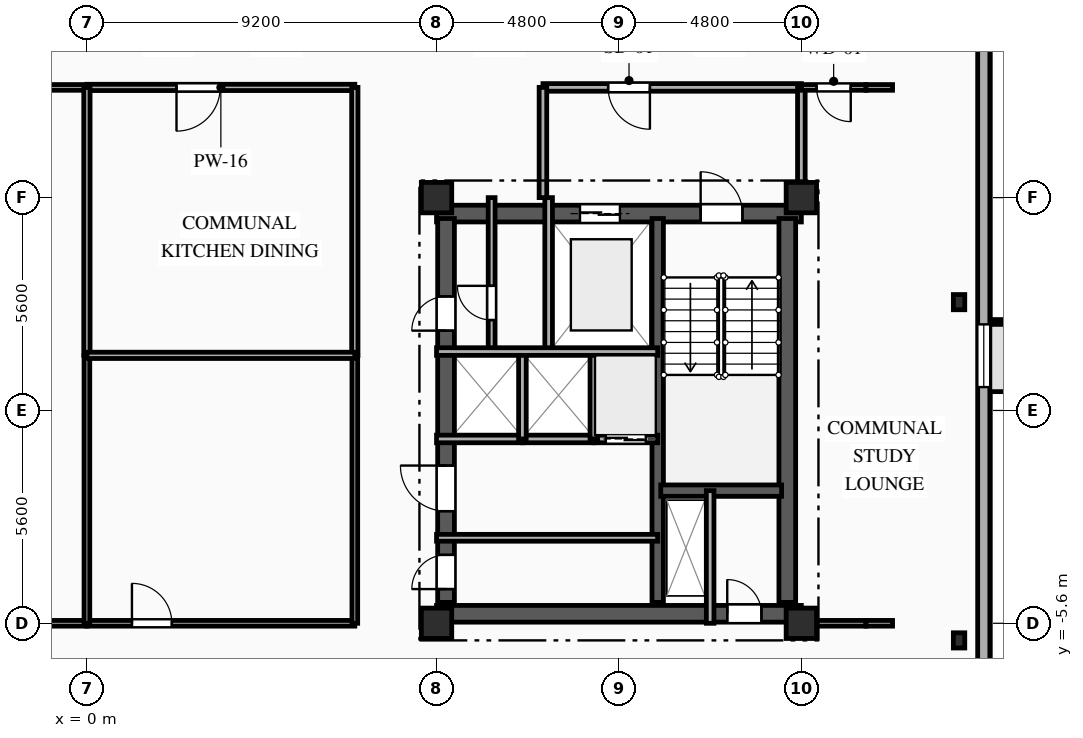
"""IFC4 building model, lengths in metres.
Left out: names, types, materials, properties, quantities, classifications, styles, units other than length and angle.
Written with IfcOpenShell. Run it as: python <this file> out.ifc"""

import sys

from ifc_helpers import new_model, si_unit, direction, frame, frame_2d, origin, origin_2d, place, context, subcontext, project, spatial, rectangle, i_section, extrude, element, fill, save


model = new_model("IFC4")
c1 = context("Model", 3, precision=1e-05, world=origin(), true_north=direction((0.0, 1.0)))
c2 = subcontext(c1, "Body", "Model", "MODEL_VIEW")
j1 = project(units=[si_unit("LENGTHUNIT", "METRE"), si_unit("PLANEANGLEUNIT", "RADIAN")], contexts=[c1])
p1 = place(None, origin())
s1 = spatial("IfcSite", under=j1, at=p1, CompositionType="ELEMENT")
p2 = place(p1, origin())
s2 = spatial("IfcBuilding", under=s1, at=p2, CompositionType="ELEMENT")
p3 = place(p2, frame((0.0, 0.0, 241.7)))
s3 = spatial("IfcBuildingStorey", under=s2, at=p3, CompositionType="ELEMENT", Elevation=241.7)
for number, where, z_axis, x_axis in (
    (1, (9.2, -5.6, 0.0), (0.0, 0.0, 1.0), (1.0, 0.0, 0.0)),
    (2, (9.2, 5.6, 0.0), (0.0, 0.0, 1.0), (1.0, 0.0, 0.0)),
    (3, (18.8, -5.6, 0.0), (0.0, 0.0, 1.0), (1.0, 0.0, 0.0)),
    (4, (18.8, 5.6, 0.0), (0.0, 0.0, 1.0), (1.0, 0.0, 0.0)),
):
    element("IfcColumn", number, at=place(p3, frame(where, z_axis=z_axis, x_axis=x_axis)), inside=s3, PredefinedType="COLUMN", context=c2, shape_type="SweptSolid", body=[
        extrude(rectangle(XDim=0.8, YDim=0.8, at=origin_2d()), origin(), (0.0, 0.0, 1.0), 3.35),
    ])
for number, where, z_axis, x_axis in (
    (5, (22.95, -6.05, 0.0), (0.0, 0.0, 1.0), (1.0, 0.0, 0.0)),
    (6, (22.95, 2.85, 0.0), (0.0, 0.0, 1.0), (1.0, 0.0, 0.0)),
):
    element("IfcColumn", number, at=place(p3, frame(where, z_axis=z_axis, x_axis=x_axis)), inside=s3, PredefinedType="COLUMN", context=c2, shape_type="SweptSolid", body=[
        extrude(i_section(OverallWidth=0.3, OverallDepth=0.4, WebThickness=0.013, FlangeThickness=0.024, FilletRadius=0.027, at=origin_2d()), origin(), (0.0, 0.0, 1.0), 3.35),
    ])
p4 = place(p3, frame((23.6, 12.4, 0.0), z_axis=(0.0, 0.0, 1.0), x_axis=(0.0, -1.0, 0.0)))
e7 = element("IfcWall", 7, at=p4, inside=s3, PredefinedType="SOLIDWALL", context=c2, shape_type="SweptSolid", body=[
    extrude(rectangle(XDim=28.0, YDim=0.32, at=frame_2d((14.0, 0.0))), origin(), (0.0, 0.0, 1.0), 3.04),
])
p5 = place(p4, frame((10.135, 0.0, 0.85)))
e8 = element("IfcOpeningElement", 8, at=p5, cuts=e7, PredefinedType="OPENING", context=c2, shape_type="SweptSolid", body=[
    extrude(rectangle(XDim=1.65, YDim=1.85, at=frame_2d((0.825, 0.925))), frame((0.0, 0.17, 0.0), z_axis=(0.0, -1.0, 0.0), x_axis=(1.0, 0.0, 0.0)), (0.0, 0.0, 1.0), 0.34),
])
p6 = place(p3, frame((9.2, 5.18, 0.0), z_axis=(0.0, 0.0, 1.0), x_axis=(1.0, 0.0, 0.0)))
e9 = element("IfcWall", 9, at=p6, inside=s3, PredefinedType="SHEAR", context=c2, shape_type="SweptSolid", body=[
    extrude(rectangle(XDim=9.6, YDim=0.44, at=frame_2d((4.8, 0.0))), origin(), (0.0, 0.0, 1.0), 3.04),
])
p7 = place(p6, frame((6.95, 0.0, 0.0)))
e10 = element("IfcOpeningElement", 10, at=p7, cuts=e9, PredefinedType="OPENING", context=c2, shape_type="SweptSolid", body=[
    extrude(rectangle(XDim=1.1, YDim=2.15, at=frame_2d((0.55, 1.075))), frame((0.0, 0.23, 0.0), z_axis=(0.0, -1.0, 0.0), x_axis=(1.0, 0.0, 0.0)), (0.0, 0.0, 1.0), 0.46),
])
p8 = place(p6, frame((3.775, 0.0, 0.0)))
e11 = element("IfcOpeningElement", 11, at=p8, cuts=e9, PredefinedType="OPENING", context=c2, shape_type="SweptSolid", body=[
    extrude(rectangle(XDim=1.05, YDim=2.1, at=frame_2d((0.525, 1.05))), frame((0.0, 0.23, 0.0), z_axis=(0.0, -1.0, 0.0), x_axis=(1.0, 0.0, 0.0)), (0.0, 0.0, 1.0), 0.46),
])
p9 = place(p3, frame((9.2, -5.35, 0.0), z_axis=(0.0, 0.0, 1.0), x_axis=(1.0, 0.0, 0.0)))
e12 = element("IfcWall", 12, at=p9, inside=s3, PredefinedType="SHEAR", context=c2, shape_type="SweptSolid", body=[
    extrude(rectangle(XDim=9.6, YDim=0.44, at=frame_2d((4.8, 0.0))), origin(), (0.0, 0.0, 1.0), 3.04),
])
p10 = place(p9, frame((7.65, 0.0, 0.0)))
e13 = element("IfcOpeningElement", 13, at=p10, cuts=e12, PredefinedType="OPENING", context=c2, shape_type="SweptSolid", body=[
    extrude(rectangle(XDim=0.9, YDim=2.1, at=frame_2d((0.45, 1.05))), frame((0.0, 0.23, 0.0), z_axis=(0.0, -1.0, 0.0), x_axis=(1.0, 0.0, 0.0)), (0.0, 0.0, 1.0), 0.46),
])
p11 = place(p3, frame((9.45, -5.05, 0.0), z_axis=(0.0, 0.0, 1.0), x_axis=(0.0, 1.0, 0.0)))
e14 = element("IfcWall", 14, at=p11, inside=s3, PredefinedType="SHEAR", context=c2, shape_type="SweptSolid", body=[
    extrude(rectangle(XDim=10.1, YDim=0.44, at=frame_2d((5.05, 0.0))), origin(), (0.0, 0.0, 1.0), 3.04),
])
p12 = place(p11, frame((7.15, 0.0, 0.0)))
e15 = element("IfcOpeningElement", 15, at=p12, cuts=e14, PredefinedType="OPENING", context=c2, shape_type="SweptSolid", body=[
    extrude(rectangle(XDim=0.9, YDim=2.1, at=frame_2d((0.45, 1.05))), frame((0.0, 0.23, 0.0), z_axis=(0.0, -1.0, 0.0), x_axis=(1.0, 0.0, 0.0)), (0.0, 0.0, 1.0), 0.46),
])
p13 = place(p11, frame((2.4, 0.0, 0.0)))
e16 = element("IfcOpeningElement", 16, at=p13, cuts=e14, PredefinedType="OPENING", context=c2, shape_type="SweptSolid", body=[
    extrude(rectangle(XDim=1.2, YDim=2.15, at=frame_2d((0.6, 1.075))), frame((0.0, 0.23, 0.0), z_axis=(0.0, -1.0, 0.0), x_axis=(1.0, 0.0, 0.0)), (0.0, 0.0, 1.0), 0.46),
])
p14 = place(p11, frame((0.35, 0.0, 0.0)))
e17 = element("IfcOpeningElement", 17, at=p14, cuts=e14, PredefinedType="OPENING", context=c2, shape_type="SweptSolid", body=[
    extrude(rectangle(XDim=0.9, YDim=2.1, at=frame_2d((0.45, 1.05))), frame((0.0, 0.23, 0.0), z_axis=(0.0, -1.0, 0.0), x_axis=(1.0, 0.0, 0.0)), (0.0, 0.0, 1.0), 0.46),
])
p15 = place(p3, frame((18.43, -5.05, 0.0), z_axis=(0.0, 0.0, 1.0), x_axis=(0.0, 1.0, 0.0)))
e18 = element("IfcWall", 18, at=p15, inside=s3, PredefinedType="SHEAR", context=c2, shape_type="SweptSolid", body=[
    extrude(rectangle(XDim=10.1, YDim=0.44, at=frame_2d((5.05, 0.0))), origin(), (0.0, 0.0, 1.0), 3.04),
])
p16 = place(p3, frame((15.02, -5.05, 0.0), z_axis=(0.0, 0.0, 1.0), x_axis=(0.0, 1.0, 0.0)))
e19 = element("IfcWall", 19, at=p16, inside=s3, PredefinedType="SHEAR", context=c2, shape_type="SweptSolid", body=[
    extrude(rectangle(XDim=10.1, YDim=0.3, at=frame_2d((5.05, 0.0))), origin(), (0.0, 0.0, 1.0), 3.04),
])
p17 = place(p3, frame((15.1, -2.11, 0.0), z_axis=(0.0, 0.0, 1.0), x_axis=(1.0, 0.0, 0.0)))
e20 = element("IfcWall", 20, at=p17, inside=s3, PredefinedType="SHEAR", context=c2, shape_type="SweptSolid", body=[
    extrude(rectangle(XDim=3.18, YDim=0.3, at=frame_2d((1.59, 0.0))), origin(), (0.0, 0.0, 1.0), 3.04),
])
p18 = place(p3, frame((16.4, -2.11, 0.0), z_axis=(0.0, 0.0, 1.0), x_axis=(0.0, -1.0, 0.0)))
e21 = element("IfcWall", 21, at=p18, inside=s3, PredefinedType="PARTITIONING", context=c2, shape_type="SweptSolid", body=[
    extrude(rectangle(XDim=3.49, YDim=0.2, at=frame_2d((1.745, 0.0))), origin(), (0.0, 0.0, 1.0), 3.04),
])
p19 = place(p3, frame((12.15, 5.6, 0.0), z_axis=(0.0, 0.0, 1.0), x_axis=(0.0, -1.0, 0.0)))
e22 = element("IfcWall", 22, at=p19, inside=s3, PredefinedType="PARTITIONING", context=c2, shape_type="SweptSolid", body=[
    extrude(rectangle(XDim=4.05, YDim=0.2, at=frame_2d((2.025, 0.0))), origin(), (0.0, 0.0, 1.0), 3.04),
])
p20 = place(p3, frame((18.8, 8.5, 0.0), z_axis=(0.0, 0.0, 1.0), x_axis=(-1.0, 0.0, 0.0)))
e23 = element("IfcWall", 23, at=p20, inside=s3, PredefinedType="PARTITIONING", context=c2, shape_type="SweptSolid", body=[
    extrude(rectangle(XDim=6.8, YDim=0.2, at=frame_2d((3.4, 0.0))), origin(), (0.0, 0.0, 1.0), 3.04),
])
p21 = place(p20, frame((3.985, 0.0, 0.0)))
e24 = element("IfcOpeningElement", 24, at=p21, cuts=e23, PredefinedType="OPENING", context=c2, shape_type="SweptSolid", body=[
    extrude(rectangle(XDim=1.1, YDim=2.15, at=frame_2d((0.55, 1.075))), frame((0.0, 0.11, 0.0), z_axis=(0.0, -1.0, 0.0), x_axis=(1.0, 0.0, 0.0)), (0.0, 0.0, 1.0), 0.22),
])
p22 = place(p3, frame((12.0, 8.5, 0.0), z_axis=(0.0, 0.0, 1.0), x_axis=(0.0, -1.0, 0.0)))
e25 = element("IfcWall", 25, at=p22, inside=s3, PredefinedType="PARTITIONING", context=c2, shape_type="SweptSolid", body=[
    extrude(rectangle(XDim=2.9, YDim=0.2, at=frame_2d((1.45, 0.0))), origin(), (0.0, 0.0, 1.0), 3.04),
])
p23 = place(p3, frame((18.8, 5.6, 0.0), z_axis=(0.0, 0.0, 1.0), x_axis=(0.0, 1.0, 0.0)))
e26 = element("IfcWall", 26, at=p23, inside=s3, PredefinedType="PARTITIONING", context=c2, shape_type="SweptSolid", body=[
    extrude(rectangle(XDim=2.9, YDim=0.2, at=frame_2d((1.45, 0.0))), origin(), (0.0, 0.0, 1.0), 2.665),
])
p24 = place(p3, frame((10.65, 1.55, 0.0), z_axis=(0.0, 0.0, 1.0), x_axis=(0.0, 1.0, 0.0)))
e27 = element("IfcWall", 27, at=p24, inside=s3, PredefinedType="PARTITIONING", context=c2, shape_type="SweptSolid", body=[
    extrude(rectangle(XDim=4.05, YDim=0.18, at=frame_2d((2.025, 0.0))), origin(), (0.0, 0.0, 1.0), 3.04),
])
p25 = place(p24, frame((0.829, 0.0, 0.0)))
e28 = element("IfcOpeningElement", 28, at=p25, cuts=e27, PredefinedType="OPENING", context=c2, shape_type="SweptSolid", body=[
    extrude(rectangle(XDim=0.9, YDim=2.1, at=frame_2d((0.45, 1.05))), frame((0.0, 0.1, 0.0), z_axis=(0.0, -1.0, 0.0), x_axis=(1.0, 0.0, 0.0)), (0.0, 0.0, 1.0), 0.2),
])
p26 = place(p3, frame((9.2, -3.35, 0.0), z_axis=(0.0, 0.0, 1.0), x_axis=(1.0, 0.0, 0.0)))
e29 = element("IfcWall", 29, at=p26, inside=s3, PredefinedType="PARTITIONING", context=c2, shape_type="SweptSolid", body=[
    extrude(rectangle(XDim=5.82, YDim=0.18, at=frame_2d((2.91, 0.0))), origin(), (0.0, 0.0, 1.0), 2.755),
])
p27 = place(p3, frame((11.46, -0.75, 0.0), z_axis=(0.0, 0.0, 1.0), x_axis=(-1.0, 0.0, 0.0)))
e30 = element("IfcWall", 30, at=p27, inside=s3, PredefinedType="PARTITIONING", context=c2, shape_type="SweptSolid", body=[
    extrude(rectangle(XDim=2.26, YDim=0.2, at=frame_2d((1.13, 0.0))), origin(), (0.0, 0.0, 1.0), 3.04),
])
p28 = place(p3, frame((13.34, -0.75, 0.0), z_axis=(0.0, 0.0, 1.0), x_axis=(-1.0, 0.0, 0.0)))
e31 = element("IfcWall", 31, at=p28, inside=s3, PredefinedType="PARTITIONING", context=c2, shape_type="SweptSolid", body=[
    extrude(rectangle(XDim=1.88, YDim=0.2, at=frame_2d((0.94, 0.0))), origin(), (0.0, 0.0, 1.0), 3.04),
])
p29 = place(p3, frame((15.02, -0.75, 0.0), z_axis=(0.0, 0.0, 1.0), x_axis=(-1.0, 0.0, 0.0)))
e32 = element("IfcWall", 32, at=p29, inside=s3, PredefinedType="PARTITIONING", context=c2, shape_type="SweptSolid", body=[
    extrude(rectangle(XDim=1.68, YDim=0.2, at=frame_2d((0.84, 0.0))), origin(), (0.0, 0.0, 1.0), 3.04),
])
p30 = place(p29, frame((0.315, 0.0, 0.0)))
e33 = element("IfcOpeningElement", 33, at=p30, cuts=e32, PredefinedType="OPENING", context=c2, shape_type="SweptSolid", body=[
    extrude(rectangle(XDim=1.05, YDim=2.1, at=frame_2d((0.525, 1.05))), frame((0.0, 0.11, 0.0), z_axis=(0.0, -1.0, 0.0), x_axis=(1.0, 0.0, 0.0)), (0.0, 0.0, 1.0), 0.22),
])
for number, where, z_axis, x_axis in (
    (34, (11.46, -0.75, 0.0), (0.0, 0.0, 1.0), (0.0, 1.0, 0.0)),
    (35, (13.34, -0.75, 0.0), (0.0, 0.0, 1.0), (0.0, 1.0, 0.0)),
):
    element("IfcWall", number, at=place(p3, frame(where, z_axis=z_axis, x_axis=x_axis)), inside=s3, PredefinedType="PARTITIONING", context=c2, shape_type="SweptSolid", body=[
        extrude(rectangle(XDim=2.3, YDim=0.2, at=frame_2d((1.15, 0.0))), origin(), (0.0, 0.0, 1.0), 3.04),
    ])
p31 = place(p3, frame((0.0, 8.5, 0.0), z_axis=(0.0, 0.0, 1.0), x_axis=(-1.0, 0.0, 0.0)))
e36 = element("IfcWall", 36, at=p31, inside=s3, PredefinedType="PARTITIONING", context=c2, shape_type="SweptSolid", body=[
    extrude(rectangle(XDim=7.05, YDim=0.15, at=frame_2d((3.525, 0.0))), origin(), (0.0, 0.0, 1.0), 3.04),
])
p32 = place(p3, frame((20.5, 8.5, 0.0), z_axis=(0.0, 0.0, 1.0), x_axis=(-1.0, 0.0, 0.0)))
e37 = element("IfcWall", 37, at=p32, inside=s3, PredefinedType="PARTITIONING", context=c2, shape_type="SweptSolid", body=[
    extrude(rectangle(XDim=1.7, YDim=0.15, at=frame_2d((0.85, 0.0))), origin(), (0.0, 0.0, 1.0), 3.04),
])
p33 = place(p32, frame((0.4, 0.0, 0.0)))
e38 = element("IfcOpeningElement", 38, at=p33, cuts=e37, PredefinedType="OPENING", context=c2, shape_type="SweptSolid", body=[
    extrude(rectangle(XDim=0.9, YDim=2.1, at=frame_2d((0.45, 1.05))), frame((0.0, 0.085, 0.0), z_axis=(0.0, -1.0, 0.0), x_axis=(1.0, 0.0, 0.0)), (0.0, 0.0, 1.0), 0.17),
])
p34 = place(p3, frame((21.2, 8.5, 0.0), z_axis=(0.0, 0.0, 1.0), x_axis=(-1.0, 0.0, 0.0)))
e39 = element("IfcWall", 39, at=p34, inside=s3, PredefinedType="PARTITIONING", context=c2, shape_type="SweptSolid", body=[
    extrude(rectangle(XDim=0.7, YDim=0.15, at=frame_2d((0.35, 0.0))), origin(), (0.0, 0.0, 1.0), 3.04),
])
p35 = place(p3, frame((7.05, 8.5, 0.0), z_axis=(0.0, 0.0, 1.0), x_axis=(-1.0, 0.0, 0.0)))
e40 = element("IfcWall", 40, at=p35, inside=s3, PredefinedType="PARTITIONING", context=c2, shape_type="SweptSolid", body=[
    extrude(rectangle(XDim=7.05, YDim=0.165, at=frame_2d((3.525, 0.0))), origin(), (0.0, 0.0, 1.0), 3.04),
])
p36 = place(p35, frame((3.542, 0.0, 0.0)))
e41 = element("IfcOpeningElement", 41, at=p36, cuts=e40, PredefinedType="OPENING", context=c2, shape_type="SweptSolid", body=[
    extrude(rectangle(XDim=1.15, YDim=2.15, at=frame_2d((0.575, 1.075))), frame((0.0, 0.093, 0.0), z_axis=(0.0, -1.0, 0.0), x_axis=(1.0, 0.0, 0.0)), (0.0, 0.0, 1.0), 0.185),
])
p37 = place(p3, frame((-7.05, -5.6, 0.0), z_axis=(0.0, 0.0, 1.0), x_axis=(1.0, 0.0, 0.0)))
e42 = element("IfcWall", 42, at=p37, inside=s3, PredefinedType="PARTITIONING", context=c2, shape_type="SweptSolid", body=[
    extrude(rectangle(XDim=7.05, YDim=0.15, at=frame_2d((3.525, 0.0))), origin(), (0.0, 0.0, 1.0), 2.525),
])
p38 = place(p3, frame((18.8, -5.6, 0.0), z_axis=(0.0, 0.0, 1.0), x_axis=(1.0, 0.0, 0.0)))
e43 = element("IfcWall", 43, at=p38, inside=s3, PredefinedType="PARTITIONING", context=c2, shape_type="SweptSolid", body=[
    extrude(rectangle(XDim=1.7, YDim=0.15, at=frame_2d((0.85, 0.0))), origin(), (0.0, 0.0, 1.0), 3.04),
])
p39 = place(p3, frame((20.5, -5.6, 0.0), z_axis=(0.0, 0.0, 1.0), x_axis=(1.0, 0.0, 0.0)))
e44 = element("IfcWall", 44, at=p39, inside=s3, PredefinedType="PARTITIONING", context=c2, shape_type="SweptSolid", body=[
    extrude(rectangle(XDim=0.7, YDim=0.15, at=frame_2d((0.35, 0.0))), origin(), (0.0, 0.0, 1.0), 3.04),
])
p40 = place(p3, frame((0.0, -5.6, 0.0), z_axis=(0.0, 0.0, 1.0), x_axis=(1.0, 0.0, 0.0)))
e45 = element("IfcWall", 45, at=p40, inside=s3, PredefinedType="PARTITIONING", context=c2, shape_type="SweptSolid", body=[
    extrude(rectangle(XDim=7.05, YDim=0.15, at=frame_2d((3.525, 0.0))), origin(), (0.0, 0.0, 1.0), 2.525),
])
p41 = place(p40, frame((1.185, 0.0, 0.0)))
e46 = element("IfcOpeningElement", 46, at=p41, cuts=e45, PredefinedType="OPENING", context=c2, shape_type="SweptSolid", body=[
    extrude(rectangle(XDim=1.05, YDim=2.15, at=frame_2d((0.525, 1.075))), frame((0.0, 0.085, 0.0), z_axis=(0.0, -1.0, 0.0), x_axis=(1.0, 0.0, 0.0)), (0.0, 0.0, 1.0), 0.17),
])
p42 = place(p3, frame((7.05, -5.6, 0.0), z_axis=(0.0, 0.0, 1.0), x_axis=(0.0, 1.0, 0.0)))
e47 = element("IfcWall", 47, at=p42, inside=s3, PredefinedType="PARTITIONING", context=c2, shape_type="SweptSolid", body=[
    extrude(rectangle(XDim=7.05, YDim=0.15, at=frame_2d((3.525, 0.0))), origin(), (0.0, 0.0, 1.0), 3.04),
])
p43 = place(p3, frame((7.05, 1.45, 0.0), z_axis=(0.0, 0.0, 1.0), x_axis=(0.0, 1.0, 0.0)))
e48 = element("IfcWall", 48, at=p43, inside=s3, PredefinedType="PARTITIONING", context=c2, shape_type="SweptSolid", body=[
    extrude(rectangle(XDim=7.05, YDim=0.165, at=frame_2d((3.525, 0.0))), origin(), (0.0, 0.0, 1.0), 3.04),
])
p44 = place(p3, frame((0.0, 1.45, 0.0), z_axis=(0.0, 0.0, 1.0), x_axis=(0.0, -1.0, 0.0)))
e49 = element("IfcWall", 49, at=p44, inside=s3, PredefinedType="PARTITIONING", context=c2, shape_type="SweptSolid", body=[
    extrude(rectangle(XDim=7.05, YDim=0.15, at=frame_2d((3.525, 0.0))), origin(), (0.0, 0.0, 1.0), 3.04),
])
for number, where, z_axis, x_axis in (
    (50, (0.0, 8.5, 0.0), (0.0, 0.0, 1.0), (0.0, -1.0, 0.0)),
    (51, (0.0, 1.45, 0.0), (0.0, 0.0, 1.0), (1.0, 0.0, 0.0)),
):
    element("IfcWall", number, at=place(p3, frame(where, z_axis=z_axis, x_axis=x_axis)), inside=s3, PredefinedType="PARTITIONING", context=c2, shape_type="SweptSolid", body=[
        extrude(rectangle(XDim=7.05, YDim=0.165, at=frame_2d((3.525, 0.0))), origin(), (0.0, 0.0, 1.0), 3.04),
    ])
p45 = place(p3, frame((9.2, 1.55, 0.0), z_axis=(0.0, 0.0, 1.0), x_axis=(1.0, 0.0, 0.0)))
e52 = element("IfcWall", 52, at=p45, inside=s3, PredefinedType="PARTITIONING", context=c2, shape_type="SweptSolid", body=[
    extrude(rectangle(XDim=5.82, YDim=0.2, at=frame_2d((2.91, 0.0))), origin(), (0.0, 0.0, 1.0), 3.04),
])
p46 = place(p5, origin())
e53 = element("IfcWindow", 53, at=p46, inside=s3, PartitioningType="SINGLE_PANEL", PredefinedType="WINDOW", context=c2, shape_type="SweptSolid", body=[
    extrude(rectangle(XDim=1.65, YDim=1.85, at=frame_2d((0.825, 0.925))), frame((0.0, 0.03, 0.0), z_axis=(0.0, -1.0, 0.0), x_axis=(1.0, 0.0, 0.0)), (0.0, 0.0, 1.0), 0.06),
])
fill(e8, e53)
p47 = place(p7, origin())
e54 = element("IfcDoor", 54, at=p47, inside=s3, OperationType="SINGLE_SWING_LEFT", PredefinedType="DOOR", context=c2, shape_type="SweptSolid", body=[
    extrude(rectangle(XDim=1.1, YDim=2.15, at=frame_2d((0.55, 1.075))), frame((0.0, 0.025, 0.0), z_axis=(0.0, -1.0, 0.0), x_axis=(1.0, 0.0, 0.0)), (0.0, 0.0, 1.0), 0.05),
])
fill(e10, e54)
p48 = place(p8, origin())
e55 = element("IfcDoor", 55, at=p48, inside=s3, OperationType="DOUBLE_DOOR_SLIDING", PredefinedType="DOOR", context=c2, shape_type="SweptSolid", body=[
    extrude(rectangle(XDim=1.05, YDim=2.1, at=frame_2d((0.525, 1.05))), frame((0.0, 0.025, 0.0), z_axis=(0.0, -1.0, 0.0), x_axis=(1.0, 0.0, 0.0)), (0.0, 0.0, 1.0), 0.05),
])
fill(e11, e55)
p49 = place(p10, origin())
e56 = element("IfcDoor", 56, at=p49, inside=s3, OperationType="SINGLE_SWING_LEFT", PredefinedType="DOOR", context=c2, shape_type="SweptSolid", body=[
    extrude(rectangle(XDim=0.9, YDim=2.1, at=frame_2d((0.45, 1.05))), frame((0.0, 0.025, 0.0), z_axis=(0.0, -1.0, 0.0), x_axis=(1.0, 0.0, 0.0)), (0.0, 0.0, 1.0), 0.05),
])
fill(e13, e56)
p50 = place(p21, origin())
e57 = element("IfcDoor", 57, at=p50, inside=s3, OperationType="SINGLE_SWING_LEFT", PredefinedType="DOOR", context=c2, shape_type="SweptSolid", body=[
    extrude(rectangle(XDim=1.1, YDim=2.15, at=frame_2d((0.55, 1.075))), frame((0.0, 0.025, 0.0), z_axis=(0.0, -1.0, 0.0), x_axis=(1.0, 0.0, 0.0)), (0.0, 0.0, 1.0), 0.05),
])
fill(e24, e57)
p51 = place(p25, origin())
e58 = element("IfcDoor", 58, at=p51, inside=s3, OperationType="SINGLE_SWING_RIGHT", PredefinedType="DOOR", context=c2, shape_type="SweptSolid", body=[
    extrude(rectangle(XDim=0.9, YDim=2.1, at=frame_2d((0.45, 1.05))), frame((0.0, 0.025, 0.0), z_axis=(0.0, -1.0, 0.0), x_axis=(1.0, 0.0, 0.0)), (0.0, 0.0, 1.0), 0.05),
])
fill(e28, e58)
p52 = place(p12, origin())
e59 = element("IfcDoor", 59, at=p52, inside=s3, OperationType="SINGLE_SWING_LEFT", PredefinedType="DOOR", context=c2, shape_type="SweptSolid", body=[
    extrude(rectangle(XDim=0.9, YDim=2.1, at=frame_2d((0.45, 1.05))), frame((0.0, 0.025, 0.0), z_axis=(0.0, -1.0, 0.0), x_axis=(1.0, 0.0, 0.0)), (0.0, 0.0, 1.0), 0.05),
])
fill(e15, e59)
p53 = place(p30, origin())
e60 = element("IfcDoor", 60, at=p53, inside=s3, OperationType="DOUBLE_DOOR_SLIDING", PredefinedType="DOOR", context=c2, shape_type="SweptSolid", body=[
    extrude(rectangle(XDim=1.05, YDim=2.1, at=frame_2d((0.525, 1.05))), frame((0.0, 0.025, 0.0), z_axis=(0.0, -1.0, 0.0), x_axis=(1.0, 0.0, 0.0)), (0.0, 0.0, 1.0), 0.05),
])
fill(e33, e60)
p54 = place(p13, origin())
e61 = element("IfcDoor", 61, at=p54, inside=s3, OperationType="SINGLE_SWING_RIGHT", PredefinedType="DOOR", context=c2, shape_type="SweptSolid", body=[
    extrude(rectangle(XDim=1.2, YDim=2.15, at=frame_2d((0.6, 1.075))), frame((0.0, 0.025, 0.0), z_axis=(0.0, -1.0, 0.0), x_axis=(1.0, 0.0, 0.0)), (0.0, 0.0, 1.0), 0.05),
])
fill(e16, e61)
p55 = place(p14, origin())
e62 = element("IfcDoor", 62, at=p55, inside=s3, OperationType="SINGLE_SWING_LEFT", PredefinedType="DOOR", context=c2, shape_type="SweptSolid", body=[
    extrude(rectangle(XDim=0.9, YDim=2.1, at=frame_2d((0.45, 1.05))), frame((0.0, 0.025, 0.0), z_axis=(0.0, -1.0, 0.0), x_axis=(1.0, 0.0, 0.0)), (0.0, 0.0, 1.0), 0.05),
])
fill(e17, e62)
p56 = place(p33, origin())
e63 = element("IfcDoor", 63, at=p56, inside=s3, OperationType="SINGLE_SWING_LEFT", PredefinedType="DOOR", context=c2, shape_type="SweptSolid", body=[
    extrude(rectangle(XDim=0.9, YDim=2.1, at=frame_2d((0.45, 1.05))), frame((0.0, 0.025, 0.0), z_axis=(0.0, -1.0, 0.0), x_axis=(1.0, 0.0, 0.0)), (0.0, 0.0, 1.0), 0.05),
])
fill(e38, e63)
p57 = place(p36, origin())
e64 = element("IfcDoor", 64, at=p57, inside=s3, OperationType="SINGLE_SWING_RIGHT", PredefinedType="DOOR", context=c2, shape_type="SweptSolid", body=[
    extrude(rectangle(XDim=1.15, YDim=2.15, at=frame_2d((0.575, 1.075))), frame((0.0, 0.025, 0.0), z_axis=(0.0, -1.0, 0.0), x_axis=(1.0, 0.0, 0.0)), (0.0, 0.0, 1.0), 0.05),
])
fill(e41, e64)
p58 = place(p41, origin())
e65 = element("IfcDoor", 65, at=p58, inside=s3, OperationType="SINGLE_SWING_LEFT", PredefinedType="DOOR", context=c2, shape_type="SweptSolid", body=[
    extrude(rectangle(XDim=1.05, YDim=2.15, at=frame_2d((0.525, 1.075))), frame((0.0, 0.025, 0.0), z_axis=(0.0, -1.0, 0.0), x_axis=(1.0, 0.0, 0.0)), (0.0, 0.0, 1.0), 0.05),
])
fill(e46, e65)
save(model, sys.argv[1])
